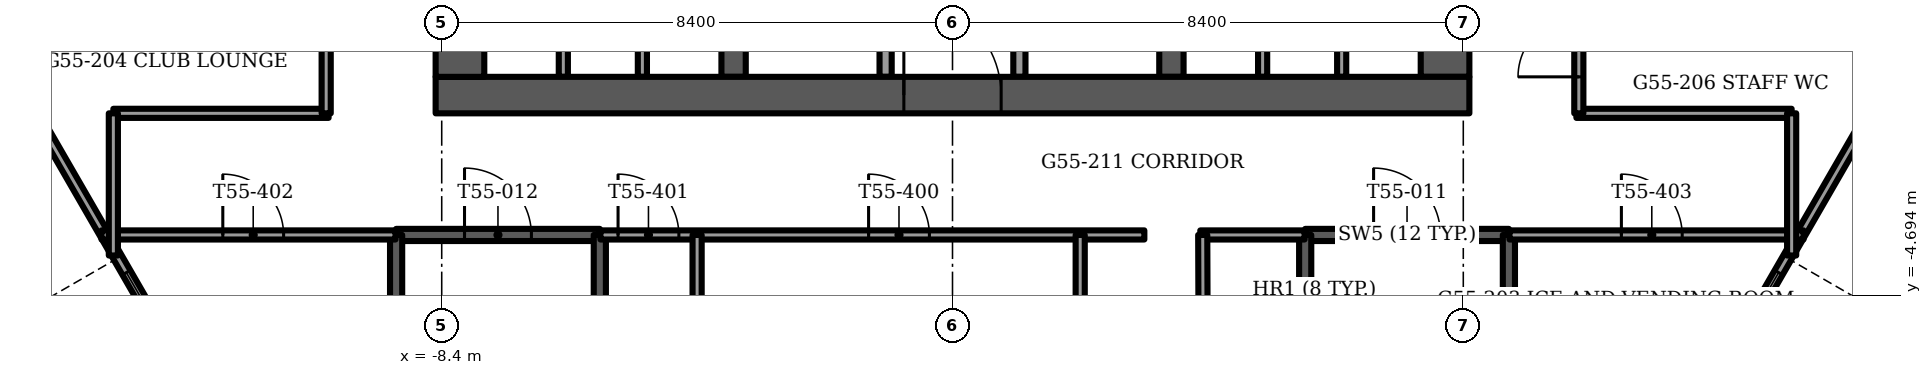
"""IFC4 building model, lengths in metres.
Left out: names, types, materials, properties, quantities, classifications, styles, units other than length and angle.
Written with IfcOpenShell. Run it as: python <this file> out.ifc"""

import sys

from ifc_helpers import new_model, si_unit, direction, frame, frame_2d, origin, place, context, subcontext, project, spatial, rectangle, extrude, element, fill, save


model = new_model("IFC4")
c1 = context("Model", 3, precision=1e-05, world=origin(), true_north=direction((0.0, 1.0)))
c2 = subcontext(c1, "Body", "Model", "MODEL_VIEW")
j1 = project(units=[si_unit("LENGTHUNIT", "METRE"), si_unit("PLANEANGLEUNIT", "RADIAN")], contexts=[c1])
p1 = place(None, origin())
s1 = spatial("IfcSite", under=j1, at=p1, CompositionType="ELEMENT")
p2 = place(p1, origin())
s2 = spatial("IfcBuilding", under=s1, at=p2, CompositionType="ELEMENT")
p3 = place(p2, frame((0.0, 0.0, 222.0)))
s3 = spatial("IfcBuildingStorey", under=s2, at=p3, CompositionType="ELEMENT", Elevation=222.0)
p4 = place(p3, frame((-8.5, -1.4, -0.3), z_axis=(0.0, 0.0, 1.0), x_axis=(1.0, 0.0, 0.0)))
e1 = element("IfcWall", 1, at=p4, inside=s3, PredefinedType="SHEAR", context=c2, shape_type="SweptSolid", body=[
    extrude(rectangle(XDim=17.0, YDim=0.6, at=frame_2d((8.5, 0.0))), origin(), (0.0, 0.0, 1.0), 3.75),
])
p5 = place(p4, frame((7.7, 0.0, 0.0)))
e2 = element("IfcOpeningElement", 2, at=p5, cuts=e1, PredefinedType="OPENING", context=c2, shape_type="SweptSolid", body=[
    extrude(rectangle(XDim=1.6, YDim=2.1, at=frame_2d((0.8, 1.05))), frame((0.0, 0.3, 0.0), z_axis=(0.0, -1.0, 0.0), x_axis=(1.0, 0.0, 0.0)), (0.0, 0.0, 1.0), 0.6),
])
p6 = place(p3, frame((-8.1, -1.1, -0.3), z_axis=(0.0, 0.0, 1.0), x_axis=(0.0, 1.0, 0.0)))
e3 = element("IfcWall", 3, at=p6, inside=s3, PredefinedType="SHEAR", context=c2, shape_type="SweptSolid", body=[
    extrude(rectangle(XDim=10.2, YDim=0.8, at=frame_2d((5.1, 0.0))), origin(), (0.0, 0.0, 1.0), 3.75),
])
p7 = place(p6, frame((8.35, 0.0, 0.0)))
e4 = element("IfcOpeningElement", 4, at=p7, cuts=e3, PredefinedType="OPENING", context=c2, shape_type="SweptSolid", body=[
    extrude(rectangle(XDim=1.1, YDim=2.1, at=frame_2d((0.55, 1.05))), frame((0.0, 0.4, 0.0), z_axis=(0.0, -1.0, 0.0), x_axis=(1.0, 0.0, 0.0)), (0.0, 0.0, 1.0), 0.8),
])
p8 = place(p3, frame((8.1, -1.1, -0.3), z_axis=(0.0, 0.0, 1.0), x_axis=(0.0, 1.0, 0.0)))
e5 = element("IfcWall", 5, at=p8, inside=s3, PredefinedType="SHEAR", context=c2, shape_type="SweptSolid", body=[
    extrude(rectangle(XDim=10.2, YDim=0.8, at=frame_2d((5.1, 0.0))), origin(), (0.0, 0.0, 1.0), 3.75),
])
p9 = place(p8, frame((8.35, 0.0, 0.0)))
e6 = element("IfcOpeningElement", 6, at=p9, cuts=e5, PredefinedType="OPENING", context=c2, shape_type="SweptSolid", body=[
    extrude(rectangle(XDim=1.1, YDim=2.1, at=frame_2d((0.55, 1.05))), frame((0.0, 0.4, 0.0), z_axis=(0.0, -1.0, 0.0), x_axis=(1.0, 0.0, 0.0)), (0.0, 0.0, 1.0), 0.8),
])
for number, where, z_axis, x_axis in (
    (7, (-3.6, -1.1, -0.3), (0.0, 0.0, 1.0), (0.0, 1.0, 0.0)),
    (8, (3.6, -1.1, -0.3), (0.0, 0.0, 1.0), (0.0, 1.0, 0.0)),
):
    element("IfcWall", number, at=place(p3, frame(where, z_axis=z_axis, x_axis=x_axis)), inside=s3, PredefinedType="SHEAR", context=c2, shape_type="SweptSolid", body=[
        extrude(rectangle(XDim=10.2, YDim=0.4, at=frame_2d((5.1, 0.0))), origin(), (0.0, 0.0, 1.0), 3.75),
    ])
p10 = place(p3, frame((-15.677, -0.696, 0.0), z_axis=(0.0, 0.0, 1.0), x_axis=(0.49999822861, -0.866026426494, 0.0)))
e9 = element("IfcWall", 9, at=p10, inside=s3, PredefinedType="SOLIDWALL", context=c2, shape_type="SweptSolid", body=[
    extrude(rectangle(XDim=10.396, YDim=0.15, at=frame_2d((5.198, 0.0))), origin(), (0.0, 0.0, 1.0), 3.45),
])
p11 = place(p10, frame((4.183, 0.0, 0.15)))
e10 = element("IfcOpeningElement", 10, at=p11, cuts=e9, PredefinedType="OPENING", context=c2, shape_type="SweptSolid", body=[
    extrude(rectangle(XDim=0.9, YDim=2.2, at=frame_2d((0.45, 1.1))), frame((0.0, 0.075, 0.0), z_axis=(0.0, -1.0, 0.0), x_axis=(1.0, 0.0, 0.0)), (0.0, 0.0, 1.0), 0.15),
])
p12 = place(p10, frame((5.536, 0.0, 0.15)))
e11 = element("IfcOpeningElement", 11, at=p12, cuts=e9, PredefinedType="OPENING", context=c2, shape_type="SweptSolid", body=[
    extrude(rectangle(XDim=1.4, YDim=2.2, at=frame_2d((0.7, 1.1))), frame((0.0, 0.075, 0.0), z_axis=(0.0, -1.0, 0.0), x_axis=(1.0, 0.0, 0.0)), (0.0, 0.0, 1.0), 0.15),
])
p13 = place(p3, frame((10.479, -9.7, 0.0), z_axis=(0.0, 0.0, 1.0), x_axis=(0.49999822861, 0.866026426494, 0.0)))
e12 = element("IfcWall", 12, at=p13, inside=s3, PredefinedType="SOLIDWALL", context=c2, shape_type="SweptSolid", body=[
    extrude(rectangle(XDim=10.396, YDim=0.15, at=frame_2d((5.198, 0.0))), origin(), (0.0, 0.0, 1.0), 3.45),
])
p14 = place(p13, frame((3.461, 0.0, 0.15)))
e13 = element("IfcOpeningElement", 13, at=p14, cuts=e12, PredefinedType="OPENING", context=c2, shape_type="SweptSolid", body=[
    extrude(rectangle(XDim=0.9, YDim=2.2, at=frame_2d((0.45, 1.1))), frame((0.0, 0.075, 0.0), z_axis=(0.0, -1.0, 0.0), x_axis=(1.0, 0.0, 0.0)), (0.0, 0.0, 1.0), 0.15),
])
p15 = place(p13, frame((4.814, 0.0, 0.15)))
e14 = element("IfcOpeningElement", 14, at=p15, cuts=e12, PredefinedType="OPENING", context=c2, shape_type="SweptSolid", body=[
    extrude(rectangle(XDim=1.4, YDim=2.2, at=frame_2d((0.7, 1.1))), frame((0.0, 0.075, 0.0), z_axis=(0.0, -1.0, 0.0), x_axis=(1.0, 0.0, 0.0)), (0.0, 0.0, 1.0), 0.15),
])
for number, where, z_axis, x_axis in (
    (15, (-1.1, -1.1, 0.0), (0.0, 0.0, 1.0), (0.0, 1.0, 0.0)),
    (16, (1.1, -1.1, 0.0), (0.0, 0.0, 1.0), (0.0, 1.0, 0.0)),
):
    element("IfcWall", number, at=place(p3, frame(where, z_axis=z_axis, x_axis=x_axis)), inside=s3, PredefinedType="PARTITIONING", context=c2, shape_type="SweptSolid", body=[
        extrude(rectangle(XDim=2.9, YDim=0.2, at=frame_2d((1.45, 0.0))), origin(), (0.0, 0.0, 1.0), 3.45),
    ])
for number, where, z_axis, x_axis in (
    (17, (-6.4, -1.1, 0.0), (0.0, 0.0, 1.0), (0.0, 1.0, 0.0)),
    (18, (-5.1, -1.1, 0.0), (0.0, 0.0, 1.0), (0.0, 1.0, 0.0)),
    (19, (5.1, -1.1, 0.0), (0.0, 0.0, 1.0), (0.0, 1.0, 0.0)),
    (20, (6.4, -1.1, 0.0), (0.0, 0.0, 1.0), (0.0, 1.0, 0.0)),
):
    element("IfcWall", number, at=place(p3, frame(where, z_axis=z_axis, x_axis=x_axis)), inside=s3, PredefinedType="PARTITIONING", context=c2, shape_type="SweptSolid", body=[
        extrude(rectangle(XDim=2.0, YDim=0.15, at=frame_2d((1.0, 0.0))), origin(), (0.0, 0.0, 1.0), 3.45),
    ])
p16 = place(p3, frame((5.8, -3.7, -0.3), z_axis=(0.0, 0.0, 1.0), x_axis=(1.0, 0.0, 0.0)))
e21 = element("IfcWall", 21, at=p16, inside=s3, PredefinedType="SOLIDWALL", context=c2, shape_type="SweptSolid", body=[
    extrude(rectangle(XDim=3.35, YDim=0.2, at=frame_2d((1.675, 0.0))), origin(), (0.0, 0.0, 1.0), 3.75),
])
p17 = place(p16, frame((1.125, 0.0, 0.0)))
e22 = element("IfcOpeningElement", 22, at=p17, cuts=e21, PredefinedType="OPENING", context=c2, shape_type="SweptSolid", body=[
    extrude(rectangle(XDim=1.1, YDim=2.1, at=frame_2d((0.55, 1.05))), frame((0.0, 0.1, 0.0), z_axis=(0.0, -1.0, 0.0), x_axis=(1.0, 0.0, 0.0)), (0.0, 0.0, 1.0), 0.2),
])
for number, where, z_axis, x_axis in (
    (23, (5.8, -3.7, -0.3), (0.0, 0.0, 1.0), (0.0, -1.0, 0.0)),
    (24, (9.15, -3.7, -0.3), (0.0, 0.0, 1.0), (0.0, -1.0, 0.0)),
):
    element("IfcWall", number, at=place(p3, frame(where, z_axis=z_axis, x_axis=x_axis)), inside=s3, PredefinedType="SOLIDWALL", context=c2, shape_type="SweptSolid", body=[
        extrude(rectangle(XDim=7.7, YDim=0.2, at=frame_2d((3.85, 0.0))), origin(), (0.0, 0.0, 1.0), 3.75),
    ])
p18 = place(p3, frame((-9.15, -3.7, -0.3), z_axis=(0.0, 0.0, 1.0), x_axis=(1.0, 0.0, 0.0)))
e25 = element("IfcWall", 25, at=p18, inside=s3, PredefinedType="SOLIDWALL", context=c2, shape_type="SweptSolid", body=[
    extrude(rectangle(XDim=3.35, YDim=0.2, at=frame_2d((1.675, 0.0))), origin(), (0.0, 0.0, 1.0), 3.75),
])
p19 = place(p18, frame((1.125, 0.0, 0.0)))
e26 = element("IfcOpeningElement", 26, at=p19, cuts=e25, PredefinedType="OPENING", context=c2, shape_type="SweptSolid", body=[
    extrude(rectangle(XDim=1.1, YDim=2.1, at=frame_2d((0.55, 1.05))), frame((0.0, 0.1, 0.0), z_axis=(0.0, -1.0, 0.0), x_axis=(1.0, 0.0, 0.0)), (0.0, 0.0, 1.0), 0.2),
])
for number, where, z_axis, x_axis in (
    (27, (-9.15, -3.7, -0.3), (0.0, 0.0, 1.0), (0.0, -1.0, 0.0)),
    (28, (-5.8, -3.7, -0.3), (0.0, 0.0, 1.0), (0.0, -1.0, 0.0)),
):
    element("IfcWall", number, at=place(p3, frame(where, z_axis=z_axis, x_axis=x_axis)), inside=s3, PredefinedType="SOLIDWALL", context=c2, shape_type="SweptSolid", body=[
        extrude(rectangle(XDim=7.7, YDim=0.2, at=frame_2d((3.85, 0.0))), origin(), (0.0, 0.0, 1.0), 3.75),
    ])
p20 = place(p3, frame((-13.995, -3.7, 0.0), z_axis=(0.0, 0.0, 1.0), x_axis=(1.0, 0.0, 0.0)))
e29 = element("IfcWall", 29, at=p20, inside=s3, PredefinedType="PARTITIONING", context=c2, shape_type="SweptSolid", body=[
    extrude(rectangle(XDim=4.835, YDim=0.15, at=frame_2d((2.417, 0.0))), origin(), (0.0, 0.0, 1.0), 3.45),
])
p21 = place(p20, frame((1.995, 0.0, 0.0)))
e30 = element("IfcOpeningElement", 30, at=p21, cuts=e29, PredefinedType="OPENING", context=c2, shape_type="SweptSolid", body=[
    extrude(rectangle(XDim=1.0, YDim=2.1, at=frame_2d((0.5, 1.05))), frame((0.0, 0.075, 0.0), z_axis=(0.0, -1.0, 0.0), x_axis=(1.0, 0.0, 0.0)), (0.0, 0.0, 1.0), 0.15),
])
p22 = place(p3, frame((-5.79, -3.7, 0.0), z_axis=(0.0, 0.0, 1.0), x_axis=(1.0, 0.0, 0.0)))
e31 = element("IfcWall", 31, at=p22, inside=s3, PredefinedType="PARTITIONING", context=c2, shape_type="SweptSolid", body=[
    extrude(rectangle(XDim=8.945, YDim=0.15, at=frame_2d((4.473, 0.0))), origin(), (0.0, 0.0, 1.0), 3.45),
])
p23 = place(p22, frame((4.41, 0.0, 0.0)))
e32 = element("IfcOpeningElement", 32, at=p23, cuts=e31, PredefinedType="OPENING", context=c2, shape_type="SweptSolid", body=[
    extrude(rectangle(XDim=1.0, YDim=2.1, at=frame_2d((0.5, 1.05))), frame((0.0, 0.075, 0.0), z_axis=(0.0, -1.0, 0.0), x_axis=(1.0, 0.0, 0.0)), (0.0, 0.0, 1.0), 0.15),
])
p24 = place(p22, frame((0.29, 0.0, 0.0)))
e33 = element("IfcOpeningElement", 33, at=p24, cuts=e31, PredefinedType="OPENING", context=c2, shape_type="SweptSolid", body=[
    extrude(rectangle(XDim=1.0, YDim=2.1, at=frame_2d((0.5, 1.05))), frame((0.0, 0.075, 0.0), z_axis=(0.0, -1.0, 0.0), x_axis=(1.0, 0.0, 0.0)), (0.0, 0.0, 1.0), 0.15),
])
p25 = place(p3, frame((4.075, -3.7, 0.0), z_axis=(0.0, 0.0, 1.0), x_axis=(1.0, 0.0, 0.0)))
e34 = element("IfcWall", 34, at=p25, inside=s3, PredefinedType="PARTITIONING", context=c2, shape_type="SweptSolid", body=[
    extrude(rectangle(XDim=1.715, YDim=0.15, at=frame_2d((0.857, 0.0))), origin(), (0.0, 0.0, 1.0), 3.45),
])
p26 = place(p3, frame((9.16, -3.7, 0.0), z_axis=(0.0, 0.0, 1.0), x_axis=(1.0, 0.0, 0.0)))
e35 = element("IfcWall", 35, at=p26, inside=s3, PredefinedType="PARTITIONING", context=c2, shape_type="SweptSolid", body=[
    extrude(rectangle(XDim=4.835, YDim=0.15, at=frame_2d((2.417, 0.0))), origin(), (0.0, 0.0, 1.0), 3.45),
])
p27 = place(p26, frame((1.84, 0.0, 0.0)))
e36 = element("IfcOpeningElement", 36, at=p27, cuts=e35, PredefinedType="OPENING", context=c2, shape_type="SweptSolid", body=[
    extrude(rectangle(XDim=1.0, YDim=2.1, at=frame_2d((0.5, 1.05))), frame((0.0, 0.075, 0.0), z_axis=(0.0, -1.0, 0.0), x_axis=(1.0, 0.0, 0.0)), (0.0, 0.0, 1.0), 0.15),
])
for number, where, z_axis, x_axis in (
    (37, (-13.8, -1.7, 0.0), (0.0, 0.0, 1.0), (1.0, 0.0, 0.0)),
    (38, (10.26, -1.7, 0.0), (0.0, 0.0, 1.0), (1.0, 0.0, 0.0)),
):
    element("IfcWall", number, at=place(p3, frame(where, z_axis=z_axis, x_axis=x_axis)), inside=s3, PredefinedType="PARTITIONING", context=c2, shape_type="SweptSolid", body=[
        extrude(rectangle(XDim=3.54, YDim=0.15, at=frame_2d((1.77, 0.0))), origin(), (0.0, 0.0, 1.0), 3.45),
    ])
p28 = place(p3, frame((13.8, -4.038, 0.0), z_axis=(0.0, 0.0, 1.0), x_axis=(0.0, 1.0, 0.0)))
e39 = element("IfcWall", 39, at=p28, inside=s3, PredefinedType="PARTITIONING", context=c2, shape_type="SweptSolid", body=[
    extrude(rectangle(XDim=2.338, YDim=0.15, at=frame_2d((1.169, 0.0))), origin(), (0.0, 0.0, 1.0), 3.45),
])
p29 = place(p3, frame((10.3, -1.7, 0.0), z_axis=(0.0, 0.0, 1.0), x_axis=(0.0, 1.0, 0.0)))
e40 = element("IfcWall", 40, at=p29, inside=s3, PredefinedType="PARTITIONING", context=c2, shape_type="SweptSolid", body=[
    extrude(rectangle(XDim=9.0, YDim=0.15, at=frame_2d((4.5, 0.0))), origin(), (0.0, 0.0, 1.0), 3.45),
])
p30 = place(p29, frame((0.6, 0.0, 0.0)))
e41 = element("IfcOpeningElement", 41, at=p30, cuts=e40, PredefinedType="OPENING", context=c2, shape_type="SweptSolid", body=[
    extrude(rectangle(XDim=1.0, YDim=2.1, at=frame_2d((0.5, 1.05))), frame((0.0, 0.075, 0.0), z_axis=(0.0, -1.0, 0.0), x_axis=(1.0, 0.0, 0.0)), (0.0, 0.0, 1.0), 0.15),
])
p31 = place(p29, frame((5.1, 0.0, 0.0)))
e42 = element("IfcOpeningElement", 42, at=p31, cuts=e40, PredefinedType="OPENING", context=c2, shape_type="SweptSolid", body=[
    extrude(rectangle(XDim=1.0, YDim=2.1, at=frame_2d((0.5, 1.05))), frame((0.0, 0.075, 0.0), z_axis=(0.0, -1.0, 0.0), x_axis=(1.0, 0.0, 0.0)), (0.0, 0.0, 1.0), 0.15),
])
p32 = place(p3, frame((2.1, -7.7, 0.0), z_axis=(0.0, 0.0, 1.0), x_axis=(0.0, 1.0, 0.0)))
e43 = element("IfcWall", 43, at=p32, inside=s3, PredefinedType="PARTITIONING", context=c2, shape_type="SweptSolid", body=[
    extrude(rectangle(XDim=4.0, YDim=0.15, at=frame_2d((2.0, 0.0))), origin(), (0.0, 0.0, 1.0), 3.45),
])
p33 = place(p3, frame((-4.2, -7.835, 0.0), z_axis=(0.0, 0.0, 1.0), x_axis=(0.0, 1.0, 0.0)))
e44 = element("IfcWall", 44, at=p33, inside=s3, PredefinedType="PARTITIONING", context=c2, shape_type="SweptSolid", body=[
    extrude(rectangle(XDim=4.135, YDim=0.15, at=frame_2d((2.067, 0.0))), origin(), (0.0, 0.0, 1.0), 3.45),
])
p34 = place(p3, frame((-10.3, -1.7, 0.0), z_axis=(0.0, 0.0, 1.0), x_axis=(0.0, 1.0, 0.0)))
e45 = element("IfcWall", 45, at=p34, inside=s3, PredefinedType="PARTITIONING", context=c2, shape_type="SweptSolid", body=[
    extrude(rectangle(XDim=9.0, YDim=0.15, at=frame_2d((4.5, 0.0))), origin(), (0.0, 0.0, 1.0), 3.45),
])
p35 = place(p34, frame((1.588, 0.0, 0.0)))
e46 = element("IfcOpeningElement", 46, at=p35, cuts=e45, PredefinedType="OPENING", context=c2, shape_type="SweptSolid", body=[
    extrude(rectangle(XDim=1.0, YDim=2.1, at=frame_2d((0.5, 1.05))), frame((0.0, 0.075, 0.0), z_axis=(0.0, -1.0, 0.0), x_axis=(1.0, 0.0, 0.0)), (0.0, 0.0, 1.0), 0.15),
])
p36 = place(p34, frame((6.15, 0.0, 0.0)))
e47 = element("IfcOpeningElement", 47, at=p36, cuts=e45, PredefinedType="OPENING", context=c2, shape_type="SweptSolid", body=[
    extrude(rectangle(XDim=1.0, YDim=2.1, at=frame_2d((0.5, 1.05))), frame((0.0, 0.075, 0.0), z_axis=(0.0, -1.0, 0.0), x_axis=(1.0, 0.0, 0.0)), (0.0, 0.0, 1.0), 0.15),
])
p37 = place(p3, frame((-13.8, -4.038, 0.0), z_axis=(0.0, 0.0, 1.0), x_axis=(0.0, 1.0, 0.0)))
e48 = element("IfcWall", 48, at=p37, inside=s3, PredefinedType="PARTITIONING", context=c2, shape_type="SweptSolid", body=[
    extrude(rectangle(XDim=2.338, YDim=0.15, at=frame_2d((1.169, 0.0))), origin(), (0.0, 0.0, 1.0), 3.45),
])
p38 = place(p3, frame((4.13, -7.695, 0.0), z_axis=(0.0, 0.0, 1.0), x_axis=(-0.003727669041, 0.999993052218, 0.0)))
e49 = element("IfcWall", 49, at=p38, inside=s3, PredefinedType="PARTITIONING", context=c2, shape_type="SweptSolid", body=[
    extrude(rectangle(XDim=3.995, YDim=0.15, at=frame_2d((1.998, 0.0))), origin(), (0.0, 0.0, 1.0), 3.45),
])
p39 = place(p11, origin())
e50 = element("IfcWindow", 50, at=p39, inside=s3, PartitioningType="SINGLE_PANEL", PredefinedType="WINDOW", context=c2, shape_type="SweptSolid", body=[
    extrude(rectangle(XDim=0.9, YDim=2.2, at=frame_2d((0.45, 1.1))), frame((0.0, 0.03, 0.0), z_axis=(0.0, -1.0, 0.0), x_axis=(1.0, 0.0, 0.0)), (0.0, 0.0, 1.0), 0.06),
])
fill(e10, e50)
p40 = place(p15, origin())
e51 = element("IfcWindow", 51, at=p40, inside=s3, PartitioningType="SINGLE_PANEL", PredefinedType="WINDOW", context=c2, shape_type="SweptSolid", body=[
    extrude(rectangle(XDim=1.4, YDim=2.2, at=frame_2d((0.7, 1.1))), frame((0.0, 0.03, 0.0), z_axis=(0.0, -1.0, 0.0), x_axis=(1.0, 0.0, 0.0)), (0.0, 0.0, 1.0), 0.06),
])
fill(e14, e51)
p41 = place(p5, origin())
e52 = element("IfcDoor", 52, at=p41, inside=s3, OperationType="DOUBLE_DOOR_SINGLE_SWING", PredefinedType="DOOR", context=c2, shape_type="SweptSolid", body=[
    extrude(rectangle(XDim=1.6, YDim=2.1, at=frame_2d((0.8, 1.05))), frame((0.0, 0.025, 0.0), z_axis=(0.0, -1.0, 0.0), x_axis=(1.0, 0.0, 0.0)), (0.0, 0.0, 1.0), 0.05),
])
fill(e2, e52)
p42 = place(p17, origin())
e53 = element("IfcDoor", 53, at=p42, inside=s3, OperationType="SINGLE_SWING_LEFT", PredefinedType="DOOR", context=c2, shape_type="SweptSolid", body=[
    extrude(rectangle(XDim=1.1, YDim=2.1, at=frame_2d((0.55, 1.05))), frame((0.0, 0.025, 0.0), z_axis=(0.0, -1.0, 0.0), x_axis=(1.0, 0.0, 0.0)), (0.0, 0.0, 1.0), 0.05),
])
fill(e22, e53)
p43 = place(p19, origin())
e54 = element("IfcDoor", 54, at=p43, inside=s3, OperationType="SINGLE_SWING_LEFT", PredefinedType="DOOR", context=c2, shape_type="SweptSolid", body=[
    extrude(rectangle(XDim=1.1, YDim=2.1, at=frame_2d((0.55, 1.05))), frame((0.0, 0.025, 0.0), z_axis=(0.0, -1.0, 0.0), x_axis=(1.0, 0.0, 0.0)), (0.0, 0.0, 1.0), 0.05),
])
fill(e26, e54)
p44 = place(p23, origin())
e55 = element("IfcDoor", 55, at=p44, inside=s3, OperationType="SINGLE_SWING_LEFT", PredefinedType="DOOR", context=c2, shape_type="SweptSolid", body=[
    extrude(rectangle(XDim=1.0, YDim=2.1, at=frame_2d((0.5, 1.05))), frame((0.0, 0.025, 0.0), z_axis=(0.0, -1.0, 0.0), x_axis=(1.0, 0.0, 0.0)), (0.0, 0.0, 1.0), 0.05),
])
fill(e32, e55)
p45 = place(p24, origin())
e56 = element("IfcDoor", 56, at=p45, inside=s3, OperationType="SINGLE_SWING_RIGHT", PredefinedType="DOOR", context=c2, shape_type="SweptSolid", body=[
    extrude(rectangle(XDim=1.0, YDim=2.1, at=frame_2d((0.5, 1.05))), frame((0.0, 0.025, 0.0), z_axis=(0.0, -1.0, 0.0), x_axis=(1.0, 0.0, 0.0)), (0.0, 0.0, 1.0), 0.05),
])
fill(e33, e56)
p46 = place(p21, origin())
e57 = element("IfcDoor", 57, at=p46, inside=s3, OperationType="SINGLE_SWING_RIGHT", PredefinedType="DOOR", context=c2, shape_type="SweptSolid", body=[
    extrude(rectangle(XDim=1.0, YDim=2.1, at=frame_2d((0.5, 1.05))), frame((0.0, 0.025, 0.0), z_axis=(0.0, -1.0, 0.0), x_axis=(1.0, 0.0, 0.0)), (0.0, 0.0, 1.0), 0.05),
])
fill(e30, e57)
p47 = place(p27, origin())
e58 = element("IfcDoor", 58, at=p47, inside=s3, OperationType="SINGLE_SWING_LEFT", PredefinedType="DOOR", context=c2, shape_type="SweptSolid", body=[
    extrude(rectangle(XDim=1.0, YDim=2.1, at=frame_2d((0.5, 1.05))), frame((0.0, 0.025, 0.0), z_axis=(0.0, -1.0, 0.0), x_axis=(1.0, 0.0, 0.0)), (0.0, 0.0, 1.0), 0.05),
])
fill(e36, e58)
p48 = place(p30, origin())
e59 = element("IfcDoor", 59, at=p48, inside=s3, OperationType="SINGLE_SWING_LEFT", PredefinedType="DOOR", context=c2, shape_type="SweptSolid", body=[
    extrude(rectangle(XDim=1.0, YDim=2.1, at=frame_2d((0.5, 1.05))), frame((0.0, 0.025, 0.0), z_axis=(0.0, -1.0, 0.0), x_axis=(1.0, 0.0, 0.0)), (0.0, 0.0, 1.0), 0.05),
])
fill(e41, e59)
save(model, sys.argv[1])
